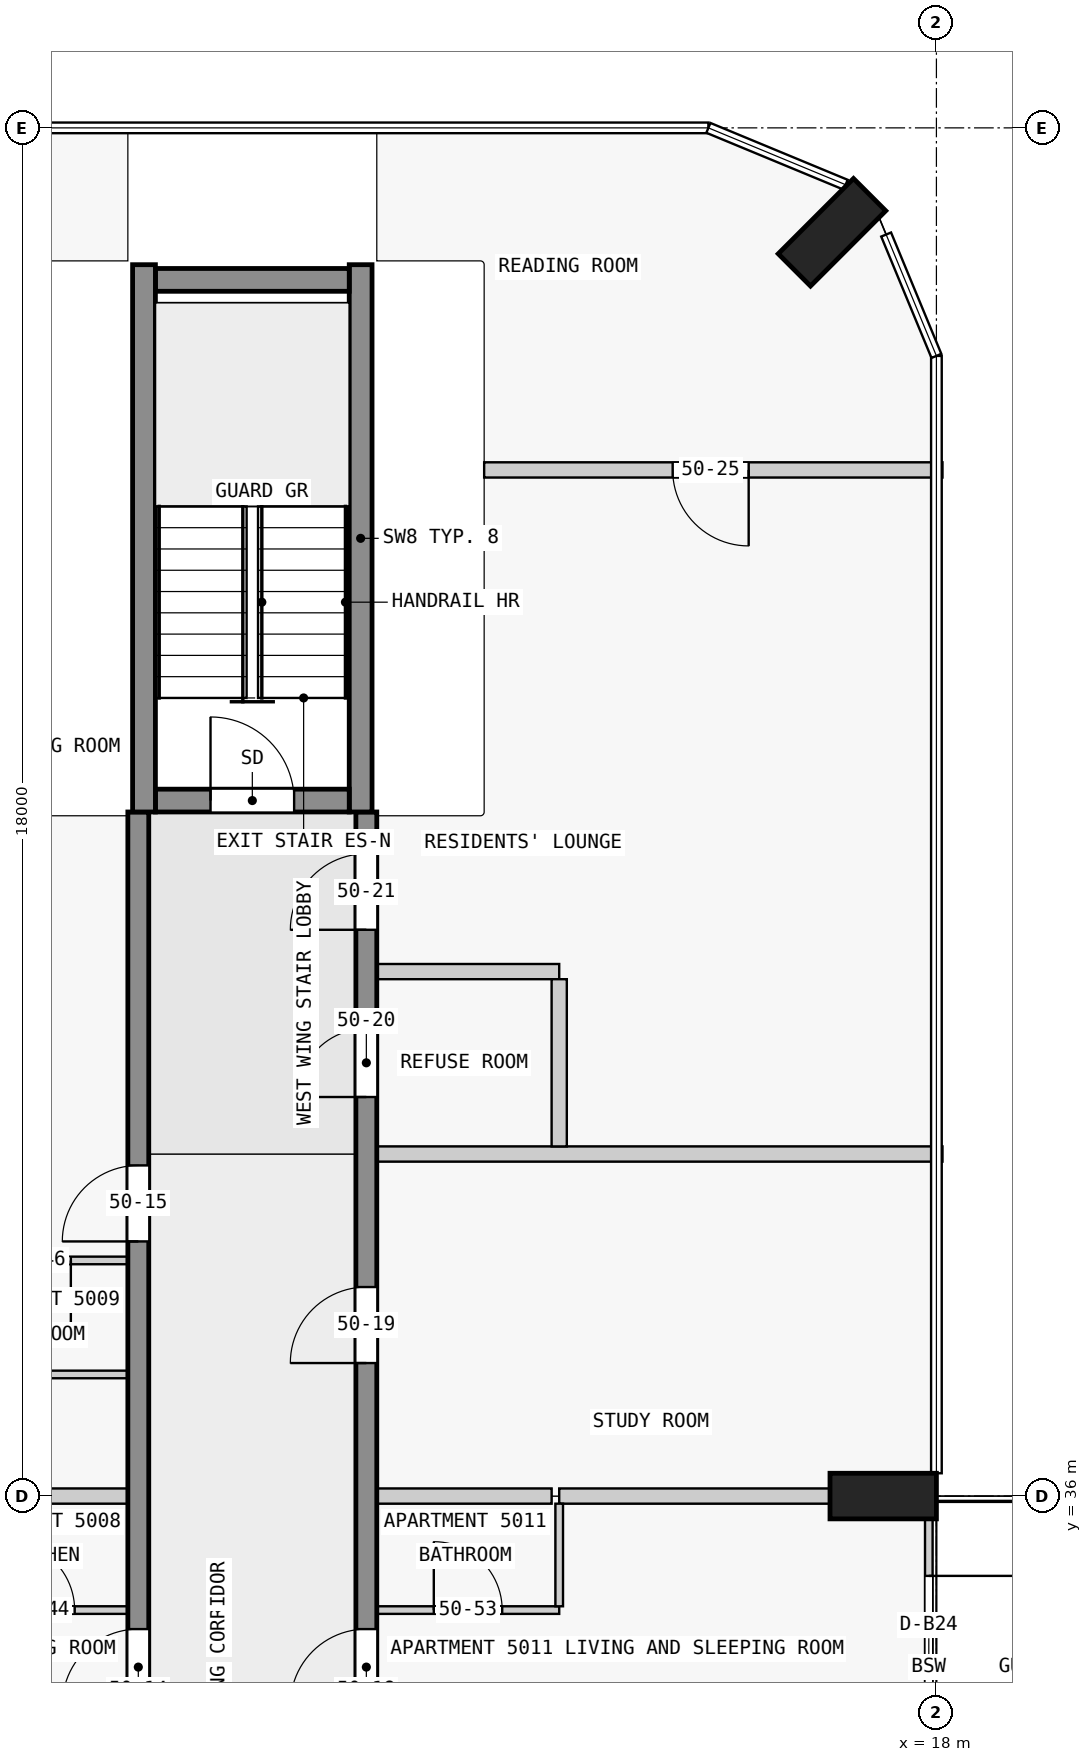
"""IFC4 building model, lengths in metres.
Left out: names, types, materials, properties, quantities, classifications, styles, units other than length and angle.
Written with IfcOpenShell. Run it as: python <this file> out.ifc"""

import sys

from ifc_helpers import new_model, si_unit, direction, frame, frame_2d, origin, origin_2d, place, context, subcontext, project, spatial, rectangle, extrude, element, fill, save


model = new_model("IFC4")
c1 = context("Model", 3, precision=1e-05, world=origin(), true_north=direction((0.0, 1.0)))
c2 = subcontext(c1, "Body", "Model", "MODEL_VIEW")
j1 = project(units=[si_unit("LENGTHUNIT", "METRE"), si_unit("PLANEANGLEUNIT", "RADIAN")], contexts=[c1])
p1 = place(None, origin())
s1 = spatial("IfcSite", under=j1, at=p1, CompositionType="ELEMENT")
p2 = place(p1, origin())
s2 = spatial("IfcBuilding", under=s1, at=p2, CompositionType="ELEMENT")
p3 = place(p2, frame((0.0, 0.0, 194.4)))
s3 = spatial("IfcBuildingStorey", under=s2, at=p3, CompositionType="ELEMENT", Elevation=194.4)
for number, where, z_axis, x_axis in (
    (1, (17.3, 36.0, 0.0), (0.0, 0.0, 1.0), (0.0, 1.0, 0.0)),
    (2, (16.626, 52.626, 0.0), (0.0, 0.0, 1.0), (-0.707, 0.707, 0.0)),
):
    element("IfcColumn", number, at=place(p3, frame(where, z_axis=z_axis, x_axis=x_axis)), inside=s3, PredefinedType="COLUMN", context=c2, shape_type="SweptSolid", body=[
        extrude(rectangle(XDim=0.6, YDim=1.4, at=origin_2d()), origin(), (0.0, 0.0, 1.0), 3.5),
    ])
p4 = place(p3, frame((7.725, 45.15, 0.0), z_axis=(0.0, 0.0, 1.0), x_axis=(1.0, 0.0, 0.0)))
e3 = element("IfcWall", 3, at=p4, inside=s3, PredefinedType="SHEAR", context=c2, shape_type="SweptSolid", body=[
    extrude(rectangle(XDim=2.55, YDim=0.3, at=frame_2d((1.275, 0.0))), origin(), (0.0, 0.0, 1.0), 3.5),
])
p5 = place(p4, frame((0.725, 0.0, 0.0)))
e4 = element("IfcOpeningElement", 4, at=p5, cuts=e3, PredefinedType="OPENING", context=c2, shape_type="SweptSolid", body=[
    extrude(rectangle(XDim=1.1, YDim=2.1, at=frame_2d((0.55, 1.05))), frame((0.0, 0.16, 0.0), z_axis=(0.0, -1.0, 0.0), x_axis=(1.0, 0.0, 0.0)), (0.0, 0.0, 1.0), 0.32),
])
p6 = place(p3, frame((7.725, 52.0, 0.0), z_axis=(0.0, 0.0, 1.0), x_axis=(1.0, 0.0, 0.0)))
e5 = element("IfcWall", 5, at=p6, inside=s3, PredefinedType="SHEAR", context=c2, shape_type="SweptSolid", body=[
    extrude(rectangle(XDim=2.55, YDim=0.3, at=frame_2d((1.275, 0.0))), origin(), (0.0, 0.0, 1.0), 3.5),
])
for number, where, z_axis, x_axis in (
    (6, (7.575, 45.0, 0.0), (0.0, 0.0, 1.0), (0.0, 1.0, 0.0)),
    (7, (10.425, 45.0, 0.0), (0.0, 0.0, 1.0), (0.0, 1.0, 0.0)),
):
    element("IfcWall", number, at=place(p3, frame(where, z_axis=z_axis, x_axis=x_axis)), inside=s3, PredefinedType="SHEAR", context=c2, shape_type="SweptSolid", body=[
        extrude(rectangle(XDim=7.2, YDim=0.3, at=frame_2d((3.6, 0.0))), origin(), (0.0, 0.0, 1.0), 3.5),
    ])
p7 = place(p3, frame((7.5, 18.0, 0.0), z_axis=(0.0, 0.0, 1.0), x_axis=(0.0, 1.0, 0.0)))
e8 = element("IfcWall", 8, at=p7, inside=s3, PredefinedType="SHEAR", context=c2, shape_type="SweptSolid", body=[
    extrude(rectangle(XDim=27.0, YDim=0.275, at=frame_2d((13.5, 0.0))), origin(), (0.0, 0.0, 1.0), 3.25),
])
p8 = place(p7, frame((1.75, 0.0, 0.0)))
e9 = element("IfcOpeningElement", 9, at=p8, cuts=e8, PredefinedType="OPENING", context=c2, shape_type="SweptSolid", body=[
    extrude(rectangle(XDim=1.0, YDim=2.1, at=frame_2d((0.5, 1.05))), frame((0.0, 0.147, 0.0), z_axis=(0.0, -1.0, 0.0), x_axis=(1.0, 0.0, 0.0)), (0.0, 0.0, 1.0), 0.295),
])
p9 = place(p7, frame((5.85, 0.0, 0.0)))
e10 = element("IfcOpeningElement", 10, at=p9, cuts=e8, PredefinedType="OPENING", context=c2, shape_type="SweptSolid", body=[
    extrude(rectangle(XDim=1.8, YDim=2.1, at=frame_2d((0.9, 1.05))), frame((0.0, 0.147, 0.0), z_axis=(0.0, -1.0, 0.0), x_axis=(1.0, 0.0, 0.0)), (0.0, 0.0, 1.0), 0.295),
])
p10 = place(p7, frame((10.75, 0.0, 0.0)))
e11 = element("IfcOpeningElement", 11, at=p10, cuts=e8, PredefinedType="OPENING", context=c2, shape_type="SweptSolid", body=[
    extrude(rectangle(XDim=1.0, YDim=2.1, at=frame_2d((0.5, 1.05))), frame((0.0, 0.147, 0.0), z_axis=(0.0, -1.0, 0.0), x_axis=(1.0, 0.0, 0.0)), (0.0, 0.0, 1.0), 0.295),
])
p11 = place(p7, frame((15.25, 0.0, 0.0)))
e12 = element("IfcOpeningElement", 12, at=p11, cuts=e8, PredefinedType="OPENING", context=c2, shape_type="SweptSolid", body=[
    extrude(rectangle(XDim=1.0, YDim=2.1, at=frame_2d((0.5, 1.05))), frame((0.0, 0.147, 0.0), z_axis=(0.0, -1.0, 0.0), x_axis=(1.0, 0.0, 0.0)), (0.0, 0.0, 1.0), 0.295),
])
p12 = place(p7, frame((21.35, 0.0, 0.0)))
e13 = element("IfcOpeningElement", 13, at=p12, cuts=e8, PredefinedType="OPENING", context=c2, shape_type="SweptSolid", body=[
    extrude(rectangle(XDim=1.0, YDim=2.1, at=frame_2d((0.5, 1.05))), frame((0.0, 0.147, 0.0), z_axis=(0.0, -1.0, 0.0), x_axis=(1.0, 0.0, 0.0)), (0.0, 0.0, 1.0), 0.295),
])
p13 = place(p3, frame((10.5, 18.0, 0.0), z_axis=(0.0, 0.0, 1.0), x_axis=(0.0, 1.0, 0.0)))
e14 = element("IfcWall", 14, at=p13, inside=s3, PredefinedType="SHEAR", context=c2, shape_type="SweptSolid", body=[
    extrude(rectangle(XDim=27.0, YDim=0.275, at=frame_2d((13.5, 0.0))), origin(), (0.0, 0.0, 1.0), 3.25),
])
p14 = place(p13, frame((1.75, 0.0, 0.0)))
e15 = element("IfcOpeningElement", 15, at=p14, cuts=e14, PredefinedType="OPENING", context=c2, shape_type="SweptSolid", body=[
    extrude(rectangle(XDim=1.0, YDim=2.1, at=frame_2d((0.5, 1.05))), frame((0.0, 0.147, 0.0), z_axis=(0.0, -1.0, 0.0), x_axis=(1.0, 0.0, 0.0)), (0.0, 0.0, 1.0), 0.295),
])
p15 = place(p13, frame((6.25, 0.0, 0.0)))
e16 = element("IfcOpeningElement", 16, at=p15, cuts=e14, PredefinedType="OPENING", context=c2, shape_type="SweptSolid", body=[
    extrude(rectangle(XDim=1.0, YDim=2.1, at=frame_2d((0.5, 1.05))), frame((0.0, 0.147, 0.0), z_axis=(0.0, -1.0, 0.0), x_axis=(1.0, 0.0, 0.0)), (0.0, 0.0, 1.0), 0.295),
])
p16 = place(p13, frame((15.25, 0.0, 0.0)))
e17 = element("IfcOpeningElement", 17, at=p16, cuts=e14, PredefinedType="OPENING", context=c2, shape_type="SweptSolid", body=[
    extrude(rectangle(XDim=1.0, YDim=2.1, at=frame_2d((0.5, 1.05))), frame((0.0, 0.147, 0.0), z_axis=(0.0, -1.0, 0.0), x_axis=(1.0, 0.0, 0.0)), (0.0, 0.0, 1.0), 0.295),
])
p17 = place(p13, frame((19.75, 0.0, 0.0)))
e18 = element("IfcOpeningElement", 18, at=p17, cuts=e14, PredefinedType="OPENING", context=c2, shape_type="SweptSolid", body=[
    extrude(rectangle(XDim=1.0, YDim=2.1, at=frame_2d((0.5, 1.05))), frame((0.0, 0.147, 0.0), z_axis=(0.0, -1.0, 0.0), x_axis=(1.0, 0.0, 0.0)), (0.0, 0.0, 1.0), 0.295),
])
p18 = place(p13, frame((23.25, 0.0, 0.0)))
e19 = element("IfcOpeningElement", 19, at=p18, cuts=e14, PredefinedType="OPENING", context=c2, shape_type="SweptSolid", body=[
    extrude(rectangle(XDim=0.9, YDim=2.1, at=frame_2d((0.45, 1.05))), frame((0.0, 0.147, 0.0), z_axis=(0.0, -1.0, 0.0), x_axis=(1.0, 0.0, 0.0)), (0.0, 0.0, 1.0), 0.295),
])
p19 = place(p13, frame((25.45, 0.0, 0.0)))
e20 = element("IfcOpeningElement", 20, at=p19, cuts=e14, PredefinedType="OPENING", context=c2, shape_type="SweptSolid", body=[
    extrude(rectangle(XDim=1.0, YDim=2.1, at=frame_2d((0.5, 1.05))), frame((0.0, 0.147, 0.0), z_axis=(0.0, -1.0, 0.0), x_axis=(1.0, 0.0, 0.0)), (0.0, 0.0, 1.0), 0.295),
])
p20 = place(p3, frame((17.9, 36.0, 0.0), z_axis=(0.0, 0.0, 1.0), x_axis=(0.0, -1.0, 0.0)))
e21 = element("IfcWall", 21, at=p20, inside=s3, PredefinedType="STANDARD", context=c2, shape_type="SweptSolid", body=[
    extrude(rectangle(XDim=4.5, YDim=0.1, at=frame_2d((2.25, 0.0))), origin(), (0.0, 0.0, 1.0), 3.25),
])
p21 = place(p20, frame((1.05, 0.0, 0.0)))
e22 = element("IfcOpeningElement", 22, at=p21, cuts=e21, PredefinedType="OPENING", context=c2, shape_type="SweptSolid", body=[
    extrude(rectangle(XDim=2.4, YDim=2.4, at=frame_2d((1.2, 1.2))), frame((0.0, 0.06, 0.0), z_axis=(0.0, -1.0, 0.0), x_axis=(1.0, 0.0, 0.0)), (0.0, 0.0, 1.0), 0.12),
])
p22 = place(p3, frame((5.012, 34.5, 0.0), z_axis=(0.0, 0.0, 1.0), x_axis=(1.0, 0.0, 0.0)))
e23 = element("IfcWall", 23, at=p22, inside=s3, PredefinedType="PARTITIONING", context=c2, shape_type="SweptSolid", body=[
    extrude(rectangle(XDim=2.35, YDim=0.1, at=frame_2d((1.175, 0.0))), origin(), (0.0, 0.0, 1.0), 3.25),
])
p23 = place(p22, frame((0.75, 0.0, 0.0)))
e24 = element("IfcOpeningElement", 24, at=p23, cuts=e23, PredefinedType="OPENING", context=c2, shape_type="SweptSolid", body=[
    extrude(rectangle(XDim=0.9, YDim=2.1, at=frame_2d((0.45, 1.05))), frame((0.0, 0.06, 0.0), z_axis=(0.0, -1.0, 0.0), x_axis=(1.0, 0.0, 0.0)), (0.0, 0.0, 1.0), 0.12),
])
p24 = place(p3, frame((10.637, 34.5, 0.0), z_axis=(0.0, 0.0, 1.0), x_axis=(1.0, 0.0, 0.0)))
e25 = element("IfcWall", 25, at=p24, inside=s3, PredefinedType="PARTITIONING", context=c2, shape_type="SweptSolid", body=[
    extrude(rectangle(XDim=2.4, YDim=0.1, at=frame_2d((1.2, 0.0))), origin(), (0.0, 0.0, 1.0), 3.25),
])
p25 = place(p24, frame((0.75, 0.0, 0.0)))
e26 = element("IfcOpeningElement", 26, at=p25, cuts=e25, PredefinedType="OPENING", context=c2, shape_type="SweptSolid", body=[
    extrude(rectangle(XDim=0.9, YDim=2.1, at=frame_2d((0.45, 1.05))), frame((0.0, 0.06, 0.0), z_axis=(0.0, -1.0, 0.0), x_axis=(1.0, 0.0, 0.0)), (0.0, 0.0, 1.0), 0.12),
])
for number, where, z_axis, x_axis in (
    (27, (7.363, 36.0, 0.0), (0.0, 0.0, 1.0), (-1.0, 0.0, 0.0)),
    (28, (12.938, 36.0, 0.0), (0.0, 0.0, 1.0), (-1.0, 0.0, 0.0)),
):
    element("IfcWall", number, at=place(p3, frame(where, z_axis=z_axis, x_axis=x_axis)), inside=s3, PredefinedType="PARTITIONING", context=c2, shape_type="SweptSolid", body=[
        extrude(rectangle(XDim=2.3, YDim=0.2, at=frame_2d((1.15, 0.0))), origin(), (0.0, 0.0, 1.0), 3.25),
    ])
p26 = place(p3, frame((13.038, 36.0, 0.0), z_axis=(0.0, 0.0, 1.0), x_axis=(1.0, 0.0, 0.0)))
e29 = element("IfcWall", 29, at=p26, inside=s3, PredefinedType="PARTITIONING", context=c2, shape_type="SweptSolid", body=[
    extrude(rectangle(XDim=3.562, YDim=0.2, at=frame_2d((1.781, 0.0))), origin(), (0.0, 0.0, 1.0), 3.25),
])
p27 = place(p3, frame((7.363, 37.6, 0.0), z_axis=(0.0, 0.0, 1.0), x_axis=(-1.0, 0.0, 0.0)))
e30 = element("IfcWall", 30, at=p27, inside=s3, PredefinedType="PARTITIONING", context=c2, shape_type="SweptSolid", body=[
    extrude(rectangle(XDim=2.35, YDim=0.1, at=frame_2d((1.175, 0.0))), origin(), (0.0, 0.0, 1.0), 3.25),
])
p28 = place(p3, frame((7.363, 39.1, 0.0), z_axis=(0.0, 0.0, 1.0), x_axis=(-1.0, 0.0, 0.0)))
e31 = element("IfcWall", 31, at=p28, inside=s3, PredefinedType="PARTITIONING", context=c2, shape_type="SweptSolid", body=[
    extrude(rectangle(XDim=2.35, YDim=0.1, at=frame_2d((1.175, 0.0))), origin(), (0.0, 0.0, 1.0), 3.25),
])
p29 = place(p28, frame((0.75, 0.0, 0.0)))
e32 = element("IfcOpeningElement", 32, at=p29, cuts=e31, PredefinedType="OPENING", context=c2, shape_type="SweptSolid", body=[
    extrude(rectangle(XDim=0.9, YDim=2.1, at=frame_2d((0.45, 1.05))), frame((0.0, 0.06, 0.0), z_axis=(0.0, -1.0, 0.0), x_axis=(1.0, 0.0, 0.0)), (0.0, 0.0, 1.0), 0.12),
])
p30 = place(p3, frame((18.08, 40.5, 0.0), z_axis=(0.0, 0.0, 1.0), x_axis=(-1.0, 0.0, 0.0)))
e33 = element("IfcWall", 33, at=p30, inside=s3, PredefinedType="PARTITIONING", context=c2, shape_type="SweptSolid", body=[
    extrude(rectangle(XDim=7.443, YDim=0.2, at=frame_2d((3.721, 0.0))), origin(), (0.0, 0.0, 1.0), 3.25),
])
p31 = place(p3, frame((13.038, 42.9, 0.0), z_axis=(0.0, 0.0, 1.0), x_axis=(-1.0, 0.0, 0.0)))
e34 = element("IfcWall", 34, at=p31, inside=s3, PredefinedType="PARTITIONING", context=c2, shape_type="SweptSolid", body=[
    extrude(rectangle(XDim=2.4, YDim=0.2, at=frame_2d((1.2, 0.0))), origin(), (0.0, 0.0, 1.0), 3.25),
])
p32 = place(p3, frame((18.08, 49.5, 0.0), z_axis=(0.0, 0.0, 1.0), x_axis=(-1.0, 0.0, 0.0)))
e35 = element("IfcWall", 35, at=p32, inside=s3, PredefinedType="PARTITIONING", context=c2, shape_type="SweptSolid", body=[
    extrude(rectangle(XDim=6.03, YDim=0.2, at=frame_2d((3.015, 0.0))), origin(), (0.0, 0.0, 1.0), 3.25),
])
p33 = place(p32, frame((2.55, 0.0, 0.0)))
e36 = element("IfcOpeningElement", 36, at=p33, cuts=e35, PredefinedType="OPENING", context=c2, shape_type="SweptSolid", body=[
    extrude(rectangle(XDim=1.0, YDim=2.1, at=frame_2d((0.5, 1.05))), frame((0.0, 0.11, 0.0), z_axis=(0.0, -1.0, 0.0), x_axis=(1.0, 0.0, 0.0)), (0.0, 0.0, 1.0), 0.22),
])
p34 = place(p3, frame((13.038, 34.55, 0.0), z_axis=(0.0, 0.0, 1.0), x_axis=(0.0, 1.0, 0.0)))
e37 = element("IfcWall", 37, at=p34, inside=s3, PredefinedType="PARTITIONING", context=c2, shape_type="SweptSolid", body=[
    extrude(rectangle(XDim=1.35, YDim=0.1, at=frame_2d((0.675, 0.0))), origin(), (0.0, 0.0, 1.0), 3.25),
])
p35 = place(p3, frame((13.038, 40.6, 0.0), z_axis=(0.0, 0.0, 1.0), x_axis=(0.0, 1.0, 0.0)))
e38 = element("IfcWall", 38, at=p35, inside=s3, PredefinedType="PARTITIONING", context=c2, shape_type="SweptSolid", body=[
    extrude(rectangle(XDim=2.2, YDim=0.2, at=frame_2d((1.1, 0.0))), origin(), (0.0, 0.0, 1.0), 3.25),
])
p36 = place(p21, origin())
e39 = element("IfcDoor", 39, at=p36, inside=s3, OperationType="SINGLE_SWING_LEFT", PredefinedType="DOOR", context=c2, shape_type="SweptSolid", body=[
    extrude(rectangle(XDim=2.4, YDim=2.4, at=frame_2d((1.2, 1.2))), frame((0.0, 0.025, 0.0), z_axis=(0.0, -1.0, 0.0), x_axis=(1.0, 0.0, 0.0)), (0.0, 0.0, 1.0), 0.05),
])
fill(e22, e39)
p37 = place(p5, origin())
e40 = element("IfcDoor", 40, at=p37, inside=s3, OperationType="SINGLE_SWING_LEFT", PredefinedType="DOOR", context=c2, shape_type="SweptSolid", body=[
    extrude(rectangle(XDim=1.1, YDim=2.1, at=frame_2d((0.55, 1.05))), frame((0.0, 0.025, 0.0), z_axis=(0.0, -1.0, 0.0), x_axis=(1.0, 0.0, 0.0)), (0.0, 0.0, 1.0), 0.05),
])
fill(e4, e40)
p38 = place(p11, origin())
e41 = element("IfcDoor", 41, at=p38, inside=s3, OperationType="SINGLE_SWING_RIGHT", PredefinedType="DOOR", context=c2, shape_type="SweptSolid", body=[
    extrude(rectangle(XDim=1.0, YDim=2.1, at=frame_2d((0.5, 1.05))), frame((0.0, 0.025, 0.0), z_axis=(0.0, -1.0, 0.0), x_axis=(1.0, 0.0, 0.0)), (0.0, 0.0, 1.0), 0.05),
])
fill(e12, e41)
p39 = place(p12, origin())
e42 = element("IfcDoor", 42, at=p39, inside=s3, OperationType="SINGLE_SWING_RIGHT", PredefinedType="DOOR", context=c2, shape_type="SweptSolid", body=[
    extrude(rectangle(XDim=1.0, YDim=2.1, at=frame_2d((0.5, 1.05))), frame((0.0, 0.025, 0.0), z_axis=(0.0, -1.0, 0.0), x_axis=(1.0, 0.0, 0.0)), (0.0, 0.0, 1.0), 0.05),
])
fill(e13, e42)
p40 = place(p16, origin())
e43 = element("IfcDoor", 43, at=p40, inside=s3, OperationType="SINGLE_SWING_RIGHT", PredefinedType="DOOR", context=c2, shape_type="SweptSolid", body=[
    extrude(rectangle(XDim=1.0, YDim=2.1, at=frame_2d((0.5, 1.05))), frame((0.0, 0.025, 0.0), z_axis=(0.0, -1.0, 0.0), x_axis=(1.0, 0.0, 0.0)), (0.0, 0.0, 1.0), 0.05),
])
fill(e17, e43)
p41 = place(p17, origin())
e44 = element("IfcDoor", 44, at=p41, inside=s3, OperationType="SINGLE_SWING_RIGHT", PredefinedType="DOOR", context=c2, shape_type="SweptSolid", body=[
    extrude(rectangle(XDim=1.0, YDim=2.1, at=frame_2d((0.5, 1.05))), frame((0.0, 0.025, 0.0), z_axis=(0.0, -1.0, 0.0), x_axis=(1.0, 0.0, 0.0)), (0.0, 0.0, 1.0), 0.05),
])
fill(e18, e44)
p42 = place(p18, origin())
e45 = element("IfcDoor", 45, at=p42, inside=s3, OperationType="SINGLE_SWING_RIGHT", PredefinedType="DOOR", context=c2, shape_type="SweptSolid", body=[
    extrude(rectangle(XDim=0.9, YDim=2.1, at=frame_2d((0.45, 1.05))), frame((0.0, 0.025, 0.0), z_axis=(0.0, -1.0, 0.0), x_axis=(1.0, 0.0, 0.0)), (0.0, 0.0, 1.0), 0.05),
])
fill(e19, e45)
p43 = place(p19, origin())
e46 = element("IfcDoor", 46, at=p43, inside=s3, OperationType="SINGLE_SWING_RIGHT", PredefinedType="DOOR", context=c2, shape_type="SweptSolid", body=[
    extrude(rectangle(XDim=1.0, YDim=2.1, at=frame_2d((0.5, 1.05))), frame((0.0, 0.025, 0.0), z_axis=(0.0, -1.0, 0.0), x_axis=(1.0, 0.0, 0.0)), (0.0, 0.0, 1.0), 0.05),
])
fill(e20, e46)
p44 = place(p33, origin())
e47 = element("IfcDoor", 47, at=p44, inside=s3, OperationType="SINGLE_SWING_RIGHT", PredefinedType="DOOR", context=c2, shape_type="SweptSolid", body=[
    extrude(rectangle(XDim=1.0, YDim=2.1, at=frame_2d((0.5, 1.05))), frame((0.0, 0.025, 0.0), z_axis=(0.0, -1.0, 0.0), x_axis=(1.0, 0.0, 0.0)), (0.0, 0.0, 1.0), 0.05),
])
fill(e36, e47)
p45 = place(p23, origin())
e48 = element("IfcDoor", 48, at=p45, inside=s3, OperationType="SINGLE_SWING_RIGHT", PredefinedType="DOOR", context=c2, shape_type="SweptSolid", body=[
    extrude(rectangle(XDim=0.9, YDim=2.1, at=frame_2d((0.45, 1.05))), frame((0.0, 0.025, 0.0), z_axis=(0.0, -1.0, 0.0), x_axis=(1.0, 0.0, 0.0)), (0.0, 0.0, 1.0), 0.05),
])
fill(e24, e48)
p46 = place(p29, origin())
e49 = element("IfcDoor", 49, at=p46, inside=s3, OperationType="SINGLE_SWING_RIGHT", PredefinedType="DOOR", context=c2, shape_type="SweptSolid", body=[
    extrude(rectangle(XDim=0.9, YDim=2.1, at=frame_2d((0.45, 1.05))), frame((0.0, 0.025, 0.0), z_axis=(0.0, -1.0, 0.0), x_axis=(1.0, 0.0, 0.0)), (0.0, 0.0, 1.0), 0.05),
])
fill(e32, e49)
p47 = place(p25, origin())
e50 = element("IfcDoor", 50, at=p47, inside=s3, OperationType="SINGLE_SWING_LEFT", PredefinedType="DOOR", context=c2, shape_type="SweptSolid", body=[
    extrude(rectangle(XDim=0.9, YDim=2.1, at=frame_2d((0.45, 1.05))), frame((0.0, 0.025, 0.0), z_axis=(0.0, -1.0, 0.0), x_axis=(1.0, 0.0, 0.0)), (0.0, 0.0, 1.0), 0.05),
])
fill(e26, e50)
save(model, sys.argv[1])
